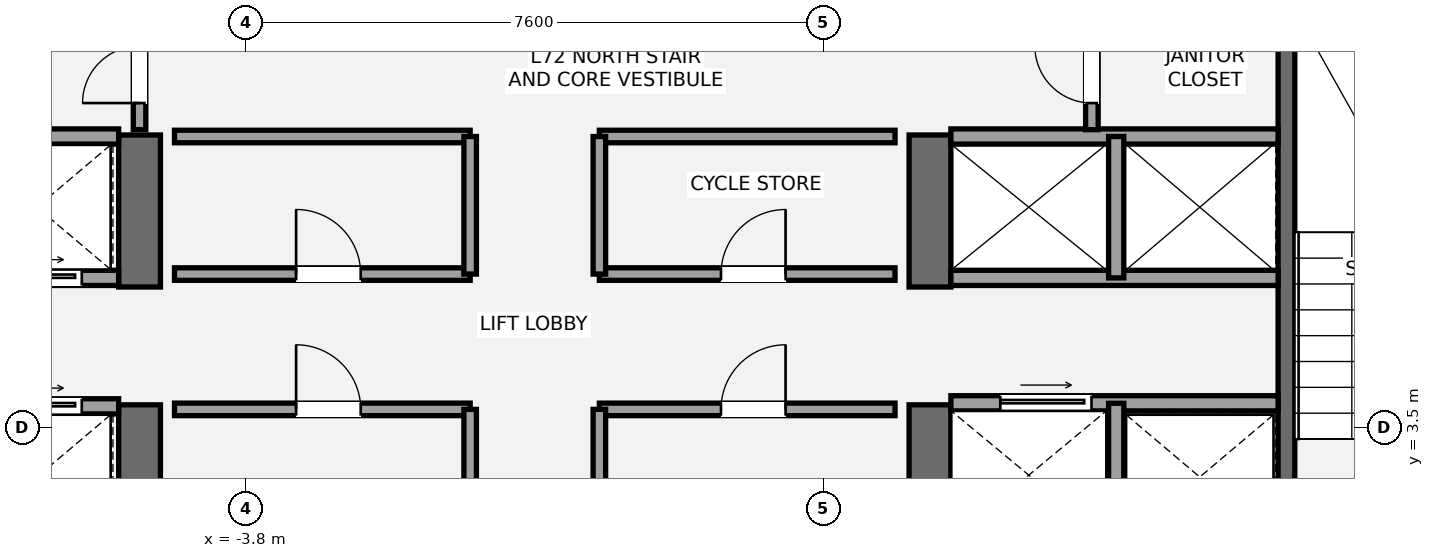
"""IFC4 building model, lengths in metres.
Left out: names, types, materials, properties, quantities, classifications, styles, units other than length and angle.
Written with IfcOpenShell. Run it as: python <this file> out.ifc"""

import sys

from ifc_helpers import new_model, si_unit, direction, frame, frame_2d, origin, place, context, subcontext, project, spatial, rectangle, extrude, element, fill, save


model = new_model("IFC4")
c1 = context("Model", 3, precision=1e-05, world=origin(), true_north=direction((0.0, 1.0)))
c2 = subcontext(c1, "Body", "Model", "MODEL_VIEW")
j1 = project(units=[si_unit("LENGTHUNIT", "METRE"), si_unit("PLANEANGLEUNIT", "RADIAN")], contexts=[c1])
p1 = place(None, origin())
s1 = spatial("IfcSite", under=j1, at=p1, CompositionType="ELEMENT")
p2 = place(p1, origin())
s2 = spatial("IfcBuilding", under=s1, at=p2, CompositionType="ELEMENT")
p3 = place(p2, frame((0.0, 0.0, 254.1)))
s3 = spatial("IfcBuildingStorey", under=s2, at=p3, CompositionType="ELEMENT", Elevation=254.1)
p4 = place(p3, frame((-5.2, 1.3, 0.0), z_axis=(0.0, 0.0, 1.0), x_axis=(0.0, 1.0, 0.0)))
e1 = element("IfcWall", 1, at=p4, inside=s3, PredefinedType="SHEAR", context=c2, shape_type="SweptSolid", body=[
    extrude(rectangle(XDim=2.5, YDim=0.55, at=frame_2d((1.25, 0.0))), origin(), (0.0, 0.0, 1.0), 3.15),
])
p5 = place(p3, frame((-5.2, 5.35, 0.0), z_axis=(0.0, 0.0, 1.0), x_axis=(0.0, 1.0, 0.0)))
e2 = element("IfcWall", 2, at=p5, inside=s3, PredefinedType="SHEAR", context=c2, shape_type="SweptSolid", body=[
    extrude(rectangle(XDim=2.0, YDim=0.55, at=frame_2d((1.0, 0.0))), origin(), (0.0, 0.0, 1.0), 3.15),
])
p6 = place(p3, frame((5.2, 1.3, 0.0), z_axis=(0.0, 0.0, 1.0), x_axis=(0.0, 1.0, 0.0)))
e3 = element("IfcWall", 3, at=p6, inside=s3, PredefinedType="SHEAR", context=c2, shape_type="SweptSolid", body=[
    extrude(rectangle(XDim=2.5, YDim=0.55, at=frame_2d((1.25, 0.0))), origin(), (0.0, 0.0, 1.0), 3.15),
])
p7 = place(p3, frame((5.2, 5.35, 0.0), z_axis=(0.0, 0.0, 1.0), x_axis=(0.0, 1.0, 0.0)))
e4 = element("IfcWall", 4, at=p7, inside=s3, PredefinedType="SHEAR", context=c2, shape_type="SweptSolid", body=[
    extrude(rectangle(XDim=2.0, YDim=0.55, at=frame_2d((1.0, 0.0))), origin(), (0.0, 0.0, 1.0), 3.15),
])
p8 = place(p3, frame((9.89, 1.85, 0.0), z_axis=(0.0, 0.0, 1.0), x_axis=(0.0, 1.0, 0.0)))
e5 = element("IfcWall", 5, at=p8, inside=s3, PredefinedType="SHEAR", context=c2, shape_type="SweptSolid", body=[
    extrude(rectangle(XDim=7.15, YDim=0.22, at=frame_2d((3.575, 0.0))), origin(), (0.0, 0.0, 1.0), 3.15),
])
p9 = place(p3, frame((-9.78, 3.78, 0.0), z_axis=(0.0, 0.0, 1.0), x_axis=(1.0, 0.0, 0.0)))
e6 = element("IfcWall", 6, at=p9, inside=s3, PredefinedType="SOLIDWALL", context=c2, shape_type="SweptSolid", body=[
    extrude(rectangle(XDim=4.305, YDim=0.2, at=frame_2d((2.152, 0.0))), origin(), (0.0, 0.0, 1.0), 2.97),
])
p10 = place(p9, frame((2.72, 0.0, 0.0)))
e7 = element("IfcOpeningElement", 7, at=p10, cuts=e6, PredefinedType="OPENING", context=c2, shape_type="SweptSolid", body=[
    extrude(rectangle(XDim=1.1, YDim=2.2, at=frame_2d((0.55, 1.1))), frame((0.0, 0.11, 0.0), z_axis=(0.0, -1.0, 0.0), x_axis=(1.0, 0.0, 0.0)), (0.0, 0.0, 1.0), 0.22),
])
p11 = place(p3, frame((-9.78, 5.47, 0.0), z_axis=(0.0, 0.0, 1.0), x_axis=(1.0, 0.0, 0.0)))
e8 = element("IfcWall", 8, at=p11, inside=s3, PredefinedType="SOLIDWALL", context=c2, shape_type="SweptSolid", body=[
    extrude(rectangle(XDim=4.305, YDim=0.2, at=frame_2d((2.152, 0.0))), origin(), (0.0, 0.0, 1.0), 2.97),
])
p12 = place(p11, frame((0.55, 0.0, 0.0)))
e9 = element("IfcOpeningElement", 9, at=p12, cuts=e8, PredefinedType="OPENING", context=c2, shape_type="SweptSolid", body=[
    extrude(rectangle(XDim=1.1, YDim=2.2, at=frame_2d((0.55, 1.1))), frame((0.0, 0.11, 0.0), z_axis=(0.0, -1.0, 0.0), x_axis=(1.0, 0.0, 0.0)), (0.0, 0.0, 1.0), 0.22),
])
p13 = place(p11, frame((2.72, 0.0, 0.0)))
e10 = element("IfcOpeningElement", 10, at=p13, cuts=e8, PredefinedType="OPENING", context=c2, shape_type="SweptSolid", body=[
    extrude(rectangle(XDim=1.1, YDim=2.2, at=frame_2d((0.55, 1.1))), frame((0.0, 0.11, 0.0), z_axis=(0.0, -1.0, 0.0), x_axis=(1.0, 0.0, 0.0)), (0.0, 0.0, 1.0), 0.22),
])
p14 = place(p3, frame((-9.78, 7.33, 0.0), z_axis=(0.0, 0.0, 1.0), x_axis=(1.0, 0.0, 0.0)))
e11 = element("IfcWall", 11, at=p14, inside=s3, PredefinedType="SOLIDWALL", context=c2, shape_type="SweptSolid", body=[
    extrude(rectangle(XDim=4.305, YDim=0.2, at=frame_2d((2.152, 0.0))), origin(), (0.0, 0.0, 1.0), 2.97),
])
p15 = place(p3, frame((5.475, 3.82, 0.0), z_axis=(0.0, 0.0, 1.0), x_axis=(1.0, 0.0, 0.0)))
e12 = element("IfcWall", 12, at=p15, inside=s3, PredefinedType="SOLIDWALL", context=c2, shape_type="SweptSolid", body=[
    extrude(rectangle(XDim=4.305, YDim=0.2, at=frame_2d((2.152, 0.0))), origin(), (0.0, 0.0, 1.0), 2.97),
])
p16 = place(p15, frame((0.65, 0.0, 0.0)))
e13 = element("IfcOpeningElement", 13, at=p16, cuts=e12, PredefinedType="OPENING", context=c2, shape_type="SweptSolid", body=[
    extrude(rectangle(XDim=1.2, YDim=2.2, at=frame_2d((0.6, 1.1))), frame((0.0, 0.11, 0.0), z_axis=(0.0, -1.0, 0.0), x_axis=(1.0, 0.0, 0.0)), (0.0, 0.0, 1.0), 0.22),
])
p17 = place(p3, frame((7.65, 1.85, 0.0), z_axis=(0.0, 0.0, 1.0), x_axis=(0.0, 1.0, 0.0)))
e14 = element("IfcWall", 14, at=p17, inside=s3, PredefinedType="SOLIDWALL", context=c2, shape_type="SweptSolid", body=[
    extrude(rectangle(XDim=1.97, YDim=0.2, at=frame_2d((0.985, 0.0))), origin(), (0.0, 0.0, 1.0), 2.97),
])
for number, where, z_axis, x_axis in (
    (15, (5.475, 5.47, 0.0), (0.0, 0.0, 1.0), (1.0, 0.0, 0.0)),
    (16, (5.475, 7.33, 0.0), (0.0, 0.0, 1.0), (1.0, 0.0, 0.0)),
):
    element("IfcWall", number, at=place(p3, frame(where, z_axis=z_axis, x_axis=x_axis)), inside=s3, PredefinedType="SOLIDWALL", context=c2, shape_type="SweptSolid", body=[
        extrude(rectangle(XDim=4.305, YDim=0.2, at=frame_2d((2.152, 0.0))), origin(), (0.0, 0.0, 1.0), 2.97),
    ])
p18 = place(p3, frame((7.65, 5.47, 0.0), z_axis=(0.0, 0.0, 1.0), x_axis=(0.0, 1.0, 0.0)))
e17 = element("IfcWall", 17, at=p18, inside=s3, PredefinedType="SOLIDWALL", context=c2, shape_type="SweptSolid", body=[
    extrude(rectangle(XDim=1.86, YDim=0.2, at=frame_2d((0.93, 0.0))), origin(), (0.0, 0.0, 1.0), 2.97),
])
p19 = place(p3, frame((-4.74, 3.74, 0.0), z_axis=(0.0, 0.0, 1.0), x_axis=(1.0, 0.0, 0.0)))
e18 = element("IfcWall", 18, at=p19, inside=s3, PredefinedType="PARTITIONING", context=c2, shape_type="SweptSolid", body=[
    extrude(rectangle(XDim=3.89, YDim=0.165, at=frame_2d((1.945, 0.0))), origin(), (0.0, 0.0, 1.0), 2.97),
])
p20 = place(p19, frame((1.6, 0.0, 0.0)))
e19 = element("IfcOpeningElement", 19, at=p20, cuts=e18, PredefinedType="OPENING", context=c2, shape_type="SweptSolid", body=[
    extrude(rectangle(XDim=0.85, YDim=2.1, at=frame_2d((0.425, 1.05))), frame((0.0, 0.093, 0.0), z_axis=(0.0, -1.0, 0.0), x_axis=(1.0, 0.0, 0.0)), (0.0, 0.0, 1.0), 0.185),
])
p21 = place(p3, frame((-0.85, 1.92, 0.0), z_axis=(0.0, 0.0, 1.0), x_axis=(0.0, 1.0, 0.0)))
e20 = element("IfcWall", 20, at=p21, inside=s3, PredefinedType="PARTITIONING", context=c2, shape_type="SweptSolid", body=[
    extrude(rectangle(XDim=1.82, YDim=0.165, at=frame_2d((0.91, 0.0))), origin(), (0.0, 0.0, 1.0), 2.97),
])
p22 = place(p3, frame((0.85, 3.74, 0.0), z_axis=(0.0, 0.0, 1.0), x_axis=(1.0, 0.0, 0.0)))
e21 = element("IfcWall", 21, at=p22, inside=s3, PredefinedType="PARTITIONING", context=c2, shape_type="SweptSolid", body=[
    extrude(rectangle(XDim=3.89, YDim=0.165, at=frame_2d((1.945, 0.0))), origin(), (0.0, 0.0, 1.0), 2.97),
])
p23 = place(p22, frame((1.6, 0.0, 0.0)))
e22 = element("IfcOpeningElement", 22, at=p23, cuts=e21, PredefinedType="OPENING", context=c2, shape_type="SweptSolid", body=[
    extrude(rectangle(XDim=0.85, YDim=2.1, at=frame_2d((0.425, 1.05))), frame((0.0, 0.093, 0.0), z_axis=(0.0, -1.0, 0.0), x_axis=(1.0, 0.0, 0.0)), (0.0, 0.0, 1.0), 0.185),
])
p24 = place(p3, frame((0.85, 1.92, 0.0), z_axis=(0.0, 0.0, 1.0), x_axis=(0.0, 1.0, 0.0)))
e23 = element("IfcWall", 23, at=p24, inside=s3, PredefinedType="PARTITIONING", context=c2, shape_type="SweptSolid", body=[
    extrude(rectangle(XDim=1.82, YDim=0.165, at=frame_2d((0.91, 0.0))), origin(), (0.0, 0.0, 1.0), 2.97),
])
p25 = place(p3, frame((-4.74, 5.52, 0.0), z_axis=(0.0, 0.0, 1.0), x_axis=(1.0, 0.0, 0.0)))
e24 = element("IfcWall", 24, at=p25, inside=s3, PredefinedType="PARTITIONING", context=c2, shape_type="SweptSolid", body=[
    extrude(rectangle(XDim=3.89, YDim=0.165, at=frame_2d((1.945, 0.0))), origin(), (0.0, 0.0, 1.0), 2.97),
])
p26 = place(p25, frame((1.6, 0.0, 0.0)))
e25 = element("IfcOpeningElement", 25, at=p26, cuts=e24, PredefinedType="OPENING", context=c2, shape_type="SweptSolid", body=[
    extrude(rectangle(XDim=0.85, YDim=2.1, at=frame_2d((0.425, 1.05))), frame((0.0, 0.093, 0.0), z_axis=(0.0, -1.0, 0.0), x_axis=(1.0, 0.0, 0.0)), (0.0, 0.0, 1.0), 0.185),
])
p27 = place(p3, frame((-4.74, 7.33, 0.0), z_axis=(0.0, 0.0, 1.0), x_axis=(1.0, 0.0, 0.0)))
e26 = element("IfcWall", 26, at=p27, inside=s3, PredefinedType="PARTITIONING", context=c2, shape_type="SweptSolid", body=[
    extrude(rectangle(XDim=3.89, YDim=0.165, at=frame_2d((1.945, 0.0))), origin(), (0.0, 0.0, 1.0), 2.97),
])
p28 = place(p3, frame((-0.85, 5.52, 0.0), z_axis=(0.0, 0.0, 1.0), x_axis=(0.0, 1.0, 0.0)))
e27 = element("IfcWall", 27, at=p28, inside=s3, PredefinedType="PARTITIONING", context=c2, shape_type="SweptSolid", body=[
    extrude(rectangle(XDim=1.81, YDim=0.165, at=frame_2d((0.905, 0.0))), origin(), (0.0, 0.0, 1.0), 2.97),
])
p29 = place(p3, frame((0.85, 5.52, 0.0), z_axis=(0.0, 0.0, 1.0), x_axis=(1.0, 0.0, 0.0)))
e28 = element("IfcWall", 28, at=p29, inside=s3, PredefinedType="PARTITIONING", context=c2, shape_type="SweptSolid", body=[
    extrude(rectangle(XDim=3.89, YDim=0.165, at=frame_2d((1.945, 0.0))), origin(), (0.0, 0.0, 1.0), 2.97),
])
p30 = place(p29, frame((1.6, 0.0, 0.0)))
e29 = element("IfcOpeningElement", 29, at=p30, cuts=e28, PredefinedType="OPENING", context=c2, shape_type="SweptSolid", body=[
    extrude(rectangle(XDim=0.85, YDim=2.1, at=frame_2d((0.425, 1.05))), frame((0.0, 0.093, 0.0), z_axis=(0.0, -1.0, 0.0), x_axis=(1.0, 0.0, 0.0)), (0.0, 0.0, 1.0), 0.185),
])
p31 = place(p3, frame((0.85, 7.33, 0.0), z_axis=(0.0, 0.0, 1.0), x_axis=(1.0, 0.0, 0.0)))
e30 = element("IfcWall", 30, at=p31, inside=s3, PredefinedType="PARTITIONING", context=c2, shape_type="SweptSolid", body=[
    extrude(rectangle(XDim=3.89, YDim=0.165, at=frame_2d((1.945, 0.0))), origin(), (0.0, 0.0, 1.0), 2.97),
])
p32 = place(p3, frame((0.85, 5.52, 0.0), z_axis=(0.0, 0.0, 1.0), x_axis=(0.0, 1.0, 0.0)))
e31 = element("IfcWall", 31, at=p32, inside=s3, PredefinedType="PARTITIONING", context=c2, shape_type="SweptSolid", body=[
    extrude(rectangle(XDim=1.81, YDim=0.165, at=frame_2d((0.905, 0.0))), origin(), (0.0, 0.0, 1.0), 2.97),
])
p33 = place(p3, frame((-5.2, 7.42, 0.0), z_axis=(0.0, 0.0, 1.0), x_axis=(0.0, 1.0, 0.0)))
e32 = element("IfcWall", 32, at=p33, inside=s3, PredefinedType="PARTITIONING", context=c2, shape_type="SweptSolid", body=[
    extrude(rectangle(XDim=1.58, YDim=0.165, at=frame_2d((0.79, 0.0))), origin(), (0.0, 0.0, 1.0), 2.97),
])
p34 = place(p33, frame((0.35, 0.0, 0.0)))
e33 = element("IfcOpeningElement", 33, at=p34, cuts=e32, PredefinedType="OPENING", context=c2, shape_type="SweptSolid", body=[
    extrude(rectangle(XDim=0.75, YDim=2.1, at=frame_2d((0.375, 1.05))), frame((0.0, 0.093, 0.0), z_axis=(0.0, -1.0, 0.0), x_axis=(1.0, 0.0, 0.0)), (0.0, 0.0, 1.0), 0.185),
])
p35 = place(p3, frame((7.33, 7.42, 0.0), z_axis=(0.0, 0.0, 1.0), x_axis=(0.0, 1.0, 0.0)))
e34 = element("IfcWall", 34, at=p35, inside=s3, PredefinedType="PARTITIONING", context=c2, shape_type="SweptSolid", body=[
    extrude(rectangle(XDim=1.58, YDim=0.165, at=frame_2d((0.79, 0.0))), origin(), (0.0, 0.0, 1.0), 2.97),
])
p36 = place(p35, frame((0.35, 0.0, 0.0)))
e35 = element("IfcOpeningElement", 35, at=p36, cuts=e34, PredefinedType="OPENING", context=c2, shape_type="SweptSolid", body=[
    extrude(rectangle(XDim=0.75, YDim=2.1, at=frame_2d((0.375, 1.05))), frame((0.0, 0.093, 0.0), z_axis=(0.0, -1.0, 0.0), x_axis=(1.0, 0.0, 0.0)), (0.0, 0.0, 1.0), 0.185),
])
p37 = place(p13, origin())
e36 = element("IfcDoor", 36, at=p37, inside=s3, OperationType="SLIDING_TO_LEFT", PredefinedType="DOOR", context=c2, shape_type="SweptSolid", body=[
    extrude(rectangle(XDim=1.1, YDim=2.2, at=frame_2d((0.55, 1.1))), frame((0.0, 0.025, 0.0), z_axis=(0.0, -1.0, 0.0), x_axis=(1.0, 0.0, 0.0)), (0.0, 0.0, 1.0), 0.05),
])
fill(e10, e36)
p38 = place(p10, origin())
e37 = element("IfcDoor", 37, at=p38, inside=s3, OperationType="SLIDING_TO_LEFT", PredefinedType="DOOR", context=c2, shape_type="SweptSolid", body=[
    extrude(rectangle(XDim=1.1, YDim=2.2, at=frame_2d((0.55, 1.1))), frame((0.0, 0.025, 0.0), z_axis=(0.0, -1.0, 0.0), x_axis=(1.0, 0.0, 0.0)), (0.0, 0.0, 1.0), 0.05),
])
fill(e7, e37)
p39 = place(p16, origin())
e38 = element("IfcDoor", 38, at=p39, inside=s3, OperationType="SLIDING_TO_RIGHT", PredefinedType="DOOR", context=c2, shape_type="SweptSolid", body=[
    extrude(rectangle(XDim=1.2, YDim=2.2, at=frame_2d((0.6, 1.1))), frame((0.0, 0.025, 0.0), z_axis=(0.0, -1.0, 0.0), x_axis=(1.0, 0.0, 0.0)), (0.0, 0.0, 1.0), 0.05),
])
fill(e13, e38)
p40 = place(p20, origin())
e39 = element("IfcDoor", 39, at=p40, inside=s3, OperationType="SINGLE_SWING_LEFT", PredefinedType="DOOR", context=c2, shape_type="SweptSolid", body=[
    extrude(rectangle(XDim=0.85, YDim=2.1, at=frame_2d((0.425, 1.05))), frame((0.0, 0.025, 0.0), z_axis=(0.0, -1.0, 0.0), x_axis=(1.0, 0.0, 0.0)), (0.0, 0.0, 1.0), 0.05),
])
fill(e19, e39)
p41 = place(p23, origin())
e40 = element("IfcDoor", 40, at=p41, inside=s3, OperationType="SINGLE_SWING_RIGHT", PredefinedType="DOOR", context=c2, shape_type="SweptSolid", body=[
    extrude(rectangle(XDim=0.85, YDim=2.1, at=frame_2d((0.425, 1.05))), frame((0.0, 0.025, 0.0), z_axis=(0.0, -1.0, 0.0), x_axis=(1.0, 0.0, 0.0)), (0.0, 0.0, 1.0), 0.05),
])
fill(e22, e40)
p42 = place(p26, origin())
e41 = element("IfcDoor", 41, at=p42, inside=s3, OperationType="SINGLE_SWING_LEFT", PredefinedType="DOOR", context=c2, shape_type="SweptSolid", body=[
    extrude(rectangle(XDim=0.85, YDim=2.1, at=frame_2d((0.425, 1.05))), frame((0.0, 0.025, 0.0), z_axis=(0.0, -1.0, 0.0), x_axis=(1.0, 0.0, 0.0)), (0.0, 0.0, 1.0), 0.05),
])
fill(e25, e41)
p43 = place(p30, origin())
e42 = element("IfcDoor", 42, at=p43, inside=s3, OperationType="SINGLE_SWING_RIGHT", PredefinedType="DOOR", context=c2, shape_type="SweptSolid", body=[
    extrude(rectangle(XDim=0.85, YDim=2.1, at=frame_2d((0.425, 1.05))), frame((0.0, 0.025, 0.0), z_axis=(0.0, -1.0, 0.0), x_axis=(1.0, 0.0, 0.0)), (0.0, 0.0, 1.0), 0.05),
])
fill(e29, e42)
p44 = place(p34, origin())
e43 = element("IfcDoor", 43, at=p44, inside=s3, OperationType="SINGLE_SWING_LEFT", PredefinedType="DOOR", context=c2, shape_type="SweptSolid", body=[
    extrude(rectangle(XDim=0.75, YDim=2.1, at=frame_2d((0.375, 1.05))), frame((0.0, 0.025, 0.0), z_axis=(0.0, -1.0, 0.0), x_axis=(1.0, 0.0, 0.0)), (0.0, 0.0, 1.0), 0.05),
])
fill(e33, e43)
p45 = place(p36, origin())
e44 = element("IfcDoor", 44, at=p45, inside=s3, OperationType="SINGLE_SWING_RIGHT", PredefinedType="DOOR", context=c2, shape_type="SweptSolid", body=[
    extrude(rectangle(XDim=0.75, YDim=2.1, at=frame_2d((0.375, 1.05))), frame((0.0, 0.025, 0.0), z_axis=(0.0, -1.0, 0.0), x_axis=(1.0, 0.0, 0.0)), (0.0, 0.0, 1.0), 0.05),
])
fill(e35, e44)
save(model, sys.argv[1])
